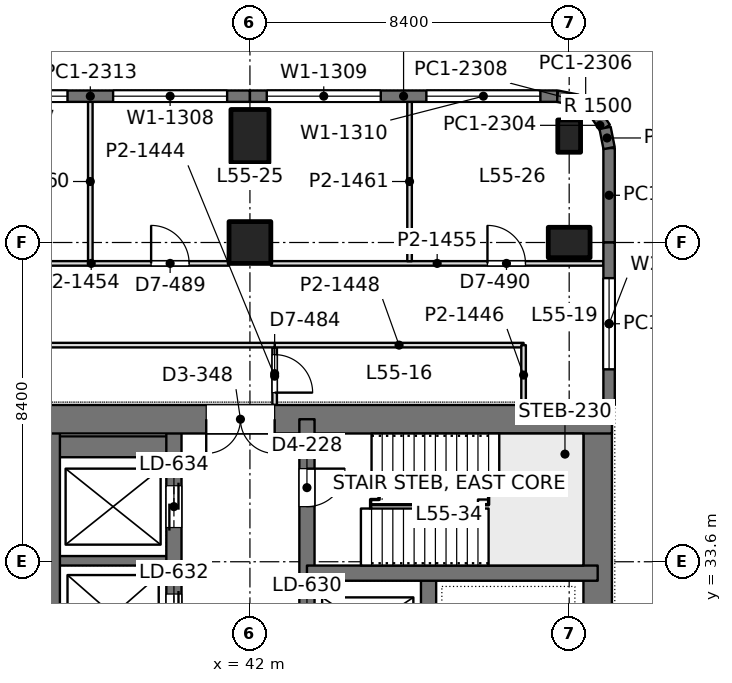
"""IFC4 building model, lengths in metres.
Left out: names, types, materials, properties, quantities, classifications, styles, units other than length and angle.
Written with IfcOpenShell. Run it as: python <this file> out.ifc"""

import sys

from ifc_helpers import new_model, si_unit, direction, frame, frame_2d, origin, origin_2d, place, context, subcontext, project, spatial, rectangle, extrude, element, fill, save


model = new_model("IFC4")
c1 = context("Model", 3, precision=1e-05, world=origin(), true_north=direction((0.0, 1.0)))
c2 = subcontext(c1, "Body", "Model", "MODEL_VIEW")
j1 = project(units=[si_unit("LENGTHUNIT", "METRE"), si_unit("PLANEANGLEUNIT", "RADIAN")], contexts=[c1])
p1 = place(None, origin())
s1 = spatial("IfcSite", under=j1, at=p1, CompositionType="ELEMENT")
p2 = place(p1, origin())
s2 = spatial("IfcBuilding", under=s1, at=p2, CompositionType="ELEMENT")
p3 = place(p2, frame((0.0, 0.0, 240.6)))
s3 = spatial("IfcBuildingStorey", under=s2, at=p3, CompositionType="ELEMENT", Elevation=240.6)
p4 = place(p3, frame((42.0, 42.0, 0.0), z_axis=(0.0, 0.0, 1.0), x_axis=(1.0, 0.0, 0.0)))
e1 = element("IfcColumn", 1, at=p4, inside=s3, PredefinedType="COLUMN", context=c2, shape_type="SweptSolid", body=[
    extrude(rectangle(XDim=1.1, YDim=1.1, at=origin_2d()), origin(), (0.0, 0.0, 1.0), 4.2),
])
p5 = place(p3, frame((42.0, 44.8, 0.0), z_axis=(0.0, 0.0, 1.0), x_axis=(1.0, 0.0, 0.0)))
e2 = element("IfcColumn", 2, at=p5, inside=s3, PredefinedType="COLUMN", context=c2, shape_type="SweptSolid", body=[
    extrude(rectangle(XDim=1.0, YDim=1.4, at=origin_2d()), origin(), (0.0, 0.0, 1.0), 4.2),
])
p6 = place(p3, frame((50.4, 42.0, 0.0), z_axis=(0.0, 0.0, 1.0), x_axis=(0.0, 1.0, 0.0)))
e3 = element("IfcColumn", 3, at=p6, inside=s3, PredefinedType="COLUMN", context=c2, shape_type="SweptSolid", body=[
    extrude(rectangle(XDim=0.8, YDim=1.1, at=origin_2d()), origin(), (0.0, 0.0, 1.0), 4.2),
])
p7 = place(p3, frame((50.4, 44.8, 0.0), z_axis=(0.0, 0.0, 1.0), x_axis=(1.0, 0.0, 0.0)))
e4 = element("IfcColumn", 4, at=p7, inside=s3, PredefinedType="COLUMN", context=c2, shape_type="SweptSolid", body=[
    extrude(rectangle(XDim=0.6, YDim=0.85, at=origin_2d()), origin(), (0.0, 0.0, 1.0), 4.2),
])
p8 = place(p3, frame((33.675, 37.35, 0.0), z_axis=(0.0, 0.0, 1.0), x_axis=(1.0, 0.0, 0.0)))
e5 = element("IfcWall", 5, at=p8, inside=s3, PredefinedType="SHEAR", context=c2, shape_type="SweptSolid", body=[
    extrude(rectangle(XDim=17.85, YDim=0.75, at=frame_2d((8.925, 0.0))), origin(), (0.0, 0.0, 1.0), 4.2),
])
p9 = place(p8, frame((7.175, 0.0, 0.0)))
e6 = element("IfcOpeningElement", 6, at=p9, cuts=e5, PredefinedType="OPENING", context=c2, shape_type="SweptSolid", body=[
    extrude(rectangle(XDim=1.8, YDim=2.4, at=frame_2d((0.9, 1.2))), frame((0.0, 0.385, 0.0), z_axis=(0.0, -1.0, 0.0), x_axis=(1.0, 0.0, 0.0)), (0.0, 0.0, 1.0), 0.77),
])
p10 = place(p3, frame((51.15, 13.05, 0.0), z_axis=(0.0, 0.0, 1.0), x_axis=(0.0, 1.0, 0.0)))
e7 = element("IfcWall", 7, at=p10, inside=s3, PredefinedType="SHEAR", context=c2, shape_type="SweptSolid", body=[
    extrude(rectangle(XDim=24.3, YDim=0.75, at=frame_2d((12.15, 0.0))), origin(), (0.0, 0.0, 1.0), 4.2),
])
p11 = place(p3, frame((43.5, 13.05, 0.0), z_axis=(0.0, 0.0, 1.0), x_axis=(0.0, 1.0, 0.0)))
e8 = element("IfcWall", 8, at=p11, inside=s3, PredefinedType="SHEAR", context=c2, shape_type="SweptSolid", body=[
    extrude(rectangle(XDim=24.3, YDim=0.4, at=frame_2d((12.15, 0.0))), origin(), (0.0, 0.0, 1.0), 4.2),
])
p12 = place(p11, frame((1.3, 0.0, 0.0)))
e9 = element("IfcOpeningElement", 9, at=p12, cuts=e8, PredefinedType="OPENING", context=c2, shape_type="SweptSolid", body=[
    extrude(rectangle(XDim=1.0, YDim=2.2, at=frame_2d((0.5, 1.1))), frame((0.0, 0.21, 0.0), z_axis=(0.0, -1.0, 0.0), x_axis=(1.0, 0.0, 0.0)), (0.0, 0.0, 1.0), 0.42),
])
p13 = place(p11, frame((22.0, 0.0, 0.0)))
e10 = element("IfcOpeningElement", 10, at=p13, cuts=e8, PredefinedType="OPENING", context=c2, shape_type="SweptSolid", body=[
    extrude(rectangle(XDim=1.0, YDim=2.2, at=frame_2d((0.5, 1.1))), frame((0.0, 0.21, 0.0), z_axis=(0.0, -1.0, 0.0), x_axis=(1.0, 0.0, 0.0)), (0.0, 0.0, 1.0), 0.42),
])
p14 = place(p11, frame((5.55, 0.0, 0.0)))
e11 = element("IfcOpeningElement", 11, at=p14, cuts=e8, PredefinedType="OPENING", context=c2, shape_type="SweptSolid", body=[
    extrude(rectangle(XDim=1.0, YDim=2.2, at=frame_2d((0.5, 1.1))), frame((0.0, 0.21, 0.0), z_axis=(0.0, -1.0, 0.0), x_axis=(1.0, 0.0, 0.0)), (0.0, 0.0, 1.0), 0.42),
])
p15 = place(p11, frame((9.55, 0.0, 0.0)))
e12 = element("IfcOpeningElement", 12, at=p15, cuts=e8, PredefinedType="OPENING", context=c2, shape_type="SweptSolid", body=[
    extrude(rectangle(XDim=1.0, YDim=2.2, at=frame_2d((0.5, 1.1))), frame((0.0, 0.21, 0.0), z_axis=(0.0, -1.0, 0.0), x_axis=(1.0, 0.0, 0.0)), (0.0, 0.0, 1.0), 0.42),
])
p16 = place(p11, frame((12.8, 0.0, 0.0)))
e13 = element("IfcOpeningElement", 13, at=p16, cuts=e8, PredefinedType="OPENING", context=c2, shape_type="SweptSolid", body=[
    extrude(rectangle(XDim=1.1, YDim=2.2, at=frame_2d((0.55, 1.1))), frame((0.0, 0.21, 0.0), z_axis=(0.0, -1.0, 0.0), x_axis=(1.0, 0.0, 0.0)), (0.0, 0.0, 1.0), 0.42),
])
p17 = place(p11, frame((15.538, 0.0, 0.0)))
e14 = element("IfcOpeningElement", 14, at=p17, cuts=e8, PredefinedType="OPENING", context=c2, shape_type="SweptSolid", body=[
    extrude(rectangle(XDim=1.1, YDim=2.2, at=frame_2d((0.55, 1.1))), frame((0.0, 0.21, 0.0), z_axis=(0.0, -1.0, 0.0), x_axis=(1.0, 0.0, 0.0)), (0.0, 0.0, 1.0), 0.42),
])
p18 = place(p11, frame((18.262, 0.0, 0.0)))
e15 = element("IfcOpeningElement", 15, at=p18, cuts=e8, PredefinedType="OPENING", context=c2, shape_type="SweptSolid", body=[
    extrude(rectangle(XDim=1.1, YDim=2.2, at=frame_2d((0.55, 1.1))), frame((0.0, 0.21, 0.0), z_axis=(0.0, -1.0, 0.0), x_axis=(1.0, 0.0, 0.0)), (0.0, 0.0, 1.0), 0.42),
])
p19 = place(p3, frame((40.0, 13.05, 0.0), z_axis=(0.0, 0.0, 1.0), x_axis=(0.0, 1.0, 0.0)))
e16 = element("IfcWall", 16, at=p19, inside=s3, PredefinedType="SHEAR", context=c2, shape_type="SweptSolid", body=[
    extrude(rectangle(XDim=24.3, YDim=0.4, at=frame_2d((12.15, 0.0))), origin(), (0.0, 0.0, 1.0), 4.2),
])
p20 = place(p19, frame((15.75, 0.0, 0.0)))
e17 = element("IfcOpeningElement", 17, at=p20, cuts=e16, PredefinedType="OPENING", context=c2, shape_type="SweptSolid", body=[
    extrude(rectangle(XDim=1.1, YDim=2.2, at=frame_2d((0.55, 1.1))), frame((0.0, 0.21, 0.0), z_axis=(0.0, -1.0, 0.0), x_axis=(1.0, 0.0, 0.0)), (0.0, 0.0, 1.0), 0.42),
])
p21 = place(p19, frame((18.6, 0.0, 0.0)))
e18 = element("IfcOpeningElement", 18, at=p21, cuts=e16, PredefinedType="OPENING", context=c2, shape_type="SweptSolid", body=[
    extrude(rectangle(XDim=1.1, YDim=2.2, at=frame_2d((0.55, 1.1))), frame((0.0, 0.21, 0.0), z_axis=(0.0, -1.0, 0.0), x_axis=(1.0, 0.0, 0.0)), (0.0, 0.0, 1.0), 0.42),
])
p22 = place(p19, frame((21.45, 0.0, 0.0)))
e19 = element("IfcOpeningElement", 19, at=p22, cuts=e16, PredefinedType="OPENING", context=c2, shape_type="SweptSolid", body=[
    extrude(rectangle(XDim=1.1, YDim=2.2, at=frame_2d((0.55, 1.1))), frame((0.0, 0.21, 0.0), z_axis=(0.0, -1.0, 0.0), x_axis=(1.0, 0.0, 0.0)), (0.0, 0.0, 1.0), 0.42),
])
p23 = place(p19, frame((8.65, 0.0, 0.0)))
e20 = element("IfcOpeningElement", 20, at=p23, cuts=e16, PredefinedType="OPENING", context=c2, shape_type="SweptSolid", body=[
    extrude(rectangle(XDim=1.8, YDim=2.4, at=frame_2d((0.9, 1.2))), frame((0.0, 0.21, 0.0), z_axis=(0.0, -1.0, 0.0), x_axis=(1.0, 0.0, 0.0)), (0.0, 0.0, 1.0), 0.42),
])
p24 = place(p3, frame((36.8, 27.925, 0.0), z_axis=(0.0, 0.0, 1.0), x_axis=(0.0, 1.0, 0.0)))
e21 = element("IfcWall", 21, at=p24, inside=s3, PredefinedType="SHEAR", context=c2, shape_type="SweptSolid", body=[
    extrude(rectangle(XDim=9.425, YDim=0.4, at=frame_2d((4.712, 0.0))), origin(), (0.0, 0.0, 1.0), 4.2),
])
p25 = place(p3, frame((51.15, 33.3, 0.0), z_axis=(0.0, 0.0, 1.0), x_axis=(-1.0, 0.0, 0.0)))
e22 = element("IfcWall", 22, at=p25, inside=s3, PredefinedType="SHEAR", context=c2, shape_type="SweptSolid", body=[
    extrude(rectangle(XDim=7.65, YDim=0.4, at=frame_2d((3.825, 0.0))), origin(), (0.0, 0.0, 1.0), 4.2),
])
p26 = place(p3, frame((46.7, 27.7, 0.0), z_axis=(0.0, 0.0, 1.0), x_axis=(0.0, 1.0, 0.0)))
e23 = element("IfcWall", 23, at=p26, inside=s3, PredefinedType="SHEAR", context=c2, shape_type="SweptSolid", body=[
    extrude(rectangle(XDim=5.6, YDim=0.4, at=frame_2d((2.8, 0.0))), origin(), (0.0, 0.0, 1.0), 4.2),
])
p27 = place(p3, frame((40.0, 33.625, 0.0), z_axis=(0.0, 0.0, 1.0), x_axis=(-1.0, 0.0, 0.0)))
e24 = element("IfcWall", 24, at=p27, inside=s3, PredefinedType="SHEAR", context=c2, shape_type="SweptSolid", body=[
    extrude(rectangle(XDim=3.2, YDim=0.25, at=frame_2d((1.6, 0.0))), origin(), (0.0, 0.0, 1.0), 4.2),
])
p28 = place(p3, frame((40.0, 36.625, 0.0), z_axis=(0.0, 0.0, 1.0), x_axis=(-1.0, 0.0, 0.0)))
e25 = element("IfcWall", 25, at=p28, inside=s3, PredefinedType="SHEAR", context=c2, shape_type="SweptSolid", body=[
    extrude(rectangle(XDim=3.2, YDim=0.55, at=frame_2d((1.6, 0.0))), origin(), (0.0, 0.0, 1.0), 4.2),
])
p29 = place(p3, frame((33.6, 45.85, 0.0), z_axis=(0.0, 0.0, 1.0), x_axis=(1.0, 0.0, 0.0)))
e26 = element("IfcWall", 26, at=p29, inside=s3, PredefinedType="SOLIDWALL", context=c2, shape_type="SweptSolid", body=[
    extrude(rectangle(XDim=8.4, YDim=0.3, at=frame_2d((4.2, 0.0))), origin(), (0.0, 0.0, 1.0), 4.0),
])
p30 = place(p29, frame((0.6, 0.0, 0.9)))
e27 = element("IfcOpeningElement", 27, at=p30, cuts=e26, PredefinedType="OPENING", context=c2, shape_type="SweptSolid", body=[
    extrude(rectangle(XDim=3.0, YDim=1.9, at=frame_2d((1.5, 0.95))), frame((0.0, 0.16, 0.0), z_axis=(0.0, -1.0, 0.0), x_axis=(1.0, 0.0, 0.0)), (0.0, 0.0, 1.0), 0.32),
])
p31 = place(p29, frame((4.8, 0.0, 0.9)))
e28 = element("IfcOpeningElement", 28, at=p31, cuts=e26, PredefinedType="OPENING", context=c2, shape_type="SweptSolid", body=[
    extrude(rectangle(XDim=3.0, YDim=1.9, at=frame_2d((1.5, 0.95))), frame((0.0, 0.16, 0.0), z_axis=(0.0, -1.0, 0.0), x_axis=(1.0, 0.0, 0.0)), (0.0, 0.0, 1.0), 0.32),
])
p32 = place(p3, frame((42.0, 45.85, 0.0), z_axis=(0.0, 0.0, 1.0), x_axis=(1.0, 0.0, 0.0)))
e29 = element("IfcWall", 29, at=p32, inside=s3, PredefinedType="SOLIDWALL", context=c2, shape_type="SweptSolid", body=[
    extrude(rectangle(XDim=8.085, YDim=0.3, at=frame_2d((4.042, 0.0))), origin(), (0.0, 0.0, 1.0), 4.0),
])
p33 = place(p32, frame((0.443, 0.0, 0.9)))
e30 = element("IfcOpeningElement", 30, at=p33, cuts=e29, PredefinedType="OPENING", context=c2, shape_type="SweptSolid", body=[
    extrude(rectangle(XDim=3.0, YDim=1.9, at=frame_2d((1.5, 0.95))), frame((0.0, 0.16, 0.0), z_axis=(0.0, -1.0, 0.0), x_axis=(1.0, 0.0, 0.0)), (0.0, 0.0, 1.0), 0.32),
])
p34 = place(p32, frame((4.643, 0.0, 0.9)))
e31 = element("IfcOpeningElement", 31, at=p34, cuts=e29, PredefinedType="OPENING", context=c2, shape_type="SweptSolid", body=[
    extrude(rectangle(XDim=3.0, YDim=1.9, at=frame_2d((1.5, 0.95))), frame((0.0, 0.16, 0.0), z_axis=(0.0, -1.0, 0.0), x_axis=(1.0, 0.0, 0.0)), (0.0, 0.0, 1.0), 0.32),
])
p35 = place(p3, frame((50.085, 45.85, 0.0), z_axis=(0.0, 0.0, 1.0), x_axis=(0.980702050465, -0.1955082817, 0.0)))
e32 = element("IfcWall", 32, at=p35, inside=s3, PredefinedType="SOLIDWALL", context=c2, shape_type="SweptSolid", body=[
    extrude(rectangle(XDim=0.541, YDim=0.3, at=frame_2d((0.271, 0.0))), origin(), (0.0, 0.0, 1.0), 4.0),
])
p36 = place(p3, frame((50.615, 45.744, 0.0), z_axis=(0.0, 0.0, 1.0), x_axis=(0.831692711774, -0.555236195849, 0.0)))
e33 = element("IfcWall", 33, at=p36, inside=s3, PredefinedType="SOLIDWALL", context=c2, shape_type="SweptSolid", body=[
    extrude(rectangle(XDim=0.525, YDim=0.3, at=frame_2d((0.263, 0.0))), origin(), (0.0, 0.0, 1.0), 4.0),
])
p37 = place(p3, frame((51.052, 45.453, 0.0), z_axis=(0.0, 0.0, 1.0), x_axis=(0.55534295404, -0.831621430339, 0.0)))
e34 = element("IfcWall", 34, at=p37, inside=s3, PredefinedType="SOLIDWALL", context=c2, shape_type="SweptSolid", body=[
    extrude(rectangle(XDim=0.526, YDim=0.3, at=frame_2d((0.263, 0.0))), origin(), (0.0, 0.0, 1.0), 4.0),
])
p38 = place(p3, frame((51.344, 45.015, 0.0), z_axis=(0.0, 0.0, 1.0), x_axis=(0.195073962632, -0.980788534345, 0.0)))
e35 = element("IfcWall", 35, at=p38, inside=s3, PredefinedType="SOLIDWALL", context=c2, shape_type="SweptSolid", body=[
    extrude(rectangle(XDim=0.541, YDim=0.3, at=frame_2d((0.271, 0.0))), origin(), (0.0, 0.0, 1.0), 4.0),
])
p39 = place(p3, frame((51.45, 44.485, 0.0), z_axis=(0.0, 0.0, 1.0), x_axis=(0.0, -1.0, 0.0)))
e36 = element("IfcWall", 36, at=p39, inside=s3, PredefinedType="SOLIDWALL", context=c2, shape_type="SweptSolid", body=[
    extrude(rectangle(XDim=2.485, YDim=0.3, at=frame_2d((1.243, 0.0))), origin(), (0.0, 0.0, 1.0), 4.0),
])
p40 = place(p3, frame((51.45, 42.0, 0.0), z_axis=(0.0, 0.0, 1.0), x_axis=(0.0, -1.0, 0.0)))
e37 = element("IfcWall", 37, at=p40, inside=s3, PredefinedType="SOLIDWALL", context=c2, shape_type="SweptSolid", body=[
    extrude(rectangle(XDim=4.275, YDim=0.3, at=frame_2d((2.137, 0.0))), origin(), (0.0, 0.0, 1.0), 4.0),
])
p41 = place(p40, frame((0.938, 0.0, 0.9)))
e38 = element("IfcOpeningElement", 38, at=p41, cuts=e37, PredefinedType="OPENING", context=c2, shape_type="SweptSolid", body=[
    extrude(rectangle(XDim=2.4, YDim=1.9, at=frame_2d((1.2, 0.95))), frame((0.0, 0.16, 0.0), z_axis=(0.0, -1.0, 0.0), x_axis=(1.0, 0.0, 0.0)), (0.0, 0.0, 1.0), 0.32),
])
p42 = place(p3, frame((34.199, 41.45, 0.0), z_axis=(0.0, 0.0, 1.0), x_axis=(1.0, 0.0, 0.0)))
e39 = element("IfcWall", 39, at=p42, inside=s3, PredefinedType="PARTITIONING", context=c2, shape_type="SweptSolid", body=[
    extrude(rectangle(XDim=7.25, YDim=0.12, at=frame_2d((3.625, 0.0))), origin(), (0.0, 0.0, 1.0), 3.4),
])
p43 = place(p42, frame((5.201, 0.0, 0.0)))
e40 = element("IfcOpeningElement", 40, at=p43, cuts=e39, PredefinedType="OPENING", context=c2, shape_type="SweptSolid", body=[
    extrude(rectangle(XDim=1.0, YDim=2.4, at=frame_2d((0.5, 1.2))), frame((0.0, 0.07, 0.0), z_axis=(0.0, -1.0, 0.0), x_axis=(1.0, 0.0, 0.0)), (0.0, 0.0, 1.0), 0.14),
])
p44 = place(p3, frame((42.551, 41.45, 0.0), z_axis=(0.0, 0.0, 1.0), x_axis=(1.0, 0.0, 0.0)))
e41 = element("IfcWall", 41, at=p44, inside=s3, PredefinedType="PARTITIONING", context=c2, shape_type="SweptSolid", body=[
    extrude(rectangle(XDim=8.751, YDim=0.12, at=frame_2d((4.375, 0.0))), origin(), (0.0, 0.0, 1.0), 3.4),
])
p45 = place(p44, frame((5.699, 0.0, 0.0)))
e42 = element("IfcOpeningElement", 42, at=p45, cuts=e41, PredefinedType="OPENING", context=c2, shape_type="SweptSolid", body=[
    extrude(rectangle(XDim=1.0, YDim=2.4, at=frame_2d((0.5, 1.2))), frame((0.0, 0.07, 0.0), z_axis=(0.0, -1.0, 0.0), x_axis=(1.0, 0.0, 0.0)), (0.0, 0.0, 1.0), 0.14),
])
for number, where, z_axis, x_axis in (
    (43, (37.8, 41.508, 0.0), (0.0, 0.0, 1.0), (0.0, 1.0, 0.0)),
    (44, (46.2, 41.508, 0.0), (0.0, 0.0, 1.0), (0.0, 1.0, 0.0)),
):
    element("IfcWall", number, at=place(p3, frame(where, z_axis=z_axis, x_axis=x_axis)), inside=s3, PredefinedType="PARTITIONING", context=c2, shape_type="SweptSolid", body=[
        extrude(rectangle(XDim=4.194, YDim=0.12, at=frame_2d((2.097, 0.0))), origin(), (0.0, 0.0, 1.0), 3.3),
    ])
p46 = place(p3, frame((1.2, 39.3, 0.0), z_axis=(0.0, 0.0, 1.0), x_axis=(1.0, 0.0, 0.0)))
e45 = element("IfcWall", 45, at=p46, inside=s3, PredefinedType="PARTITIONING", context=c2, shape_type="SweptSolid", body=[
    extrude(rectangle(XDim=41.452, YDim=0.12, at=frame_2d((20.726, 0.0))), origin(), (0.0, 0.0, 1.0), 3.3),
])
p47 = place(p46, frame((4.3, 0.0, 0.0)))
e46 = element("IfcOpeningElement", 46, at=p47, cuts=e45, PredefinedType="OPENING", context=c2, shape_type="SweptSolid", body=[
    extrude(rectangle(XDim=1.8, YDim=2.2, at=frame_2d((0.9, 1.1))), frame((0.0, 0.07, 0.0), z_axis=(0.0, -1.0, 0.0), x_axis=(1.0, 0.0, 0.0)), (0.0, 0.0, 1.0), 0.14),
])
p48 = place(p46, frame((9.5, 0.0, 0.0)))
e47 = element("IfcOpeningElement", 47, at=p48, cuts=e45, PredefinedType="OPENING", context=c2, shape_type="SweptSolid", body=[
    extrude(rectangle(XDim=1.8, YDim=2.2, at=frame_2d((0.9, 1.1))), frame((0.0, 0.07, 0.0), z_axis=(0.0, -1.0, 0.0), x_axis=(1.0, 0.0, 0.0)), (0.0, 0.0, 1.0), 0.14),
])
p49 = place(p46, frame((23.317, 0.0, 0.0)))
e48 = element("IfcOpeningElement", 48, at=p49, cuts=e45, PredefinedType="OPENING", context=c2, shape_type="SweptSolid", body=[
    extrude(rectangle(XDim=1.8, YDim=2.2, at=frame_2d((0.9, 1.1))), frame((0.0, 0.07, 0.0), z_axis=(0.0, -1.0, 0.0), x_axis=(1.0, 0.0, 0.0)), (0.0, 0.0, 1.0), 0.14),
])
p50 = place(p46, frame((33.0, 0.0, 0.0)))
e49 = element("IfcOpeningElement", 49, at=p50, cuts=e45, PredefinedType="OPENING", context=c2, shape_type="SweptSolid", body=[
    extrude(rectangle(XDim=1.8, YDim=2.2, at=frame_2d((0.9, 1.1))), frame((0.0, 0.07, 0.0), z_axis=(0.0, -1.0, 0.0), x_axis=(1.0, 0.0, 0.0)), (0.0, 0.0, 1.0), 0.14),
])
p51 = place(p3, frame((42.65, 37.724, 0.0), z_axis=(0.0, 0.0, 1.0), x_axis=(0.0, 1.0, 0.0)))
e50 = element("IfcWall", 50, at=p51, inside=s3, PredefinedType="PARTITIONING", context=c2, shape_type="SweptSolid", body=[
    extrude(rectangle(XDim=1.518, YDim=0.12, at=frame_2d((0.759, 0.0))), origin(), (0.0, 0.0, 1.0), 4.0),
])
p52 = place(p51, frame((0.326, 0.0, 0.0)))
e51 = element("IfcOpeningElement", 51, at=p52, cuts=e50, PredefinedType="OPENING", context=c2, shape_type="SweptSolid", body=[
    extrude(rectangle(XDim=1.0, YDim=2.4, at=frame_2d((0.5, 1.2))), frame((0.0, 0.07, 0.0), z_axis=(0.0, -1.0, 0.0), x_axis=(1.0, 0.0, 0.0)), (0.0, 0.0, 1.0), 0.14),
])
p53 = place(p3, frame((42.648, 39.3, 0.0), z_axis=(0.0, 0.0, 1.0), x_axis=(1.0, 0.0, 0.0)))
e52 = element("IfcWall", 52, at=p53, inside=s3, PredefinedType="PARTITIONING", context=c2, shape_type="SweptSolid", body=[
    extrude(rectangle(XDim=6.552, YDim=0.12, at=frame_2d((3.276, 0.0))), origin(), (0.0, 0.0, 1.0), 3.4),
])
p54 = place(p3, frame((49.2, 37.724, 0.0), z_axis=(0.0, 0.0, 1.0), x_axis=(0.0, 1.0, 0.0)))
e53 = element("IfcWall", 53, at=p54, inside=s3, PredefinedType="PARTITIONING", context=c2, shape_type="SweptSolid", body=[
    extrude(rectangle(XDim=1.576, YDim=0.12, at=frame_2d((0.788, 0.0))), origin(), (0.0, 0.0, 1.0), 4.0),
])
p55 = place(p30, origin())
e54 = element("IfcWindow", 54, at=p55, inside=s3, PartitioningType="SINGLE_PANEL", PredefinedType="WINDOW", context=c2, shape_type="SweptSolid", body=[
    extrude(rectangle(XDim=3.0, YDim=1.9, at=frame_2d((1.5, 0.95))), frame((0.0, 0.03, 0.0), z_axis=(0.0, -1.0, 0.0), x_axis=(1.0, 0.0, 0.0)), (0.0, 0.0, 1.0), 0.06),
])
fill(e27, e54)
p56 = place(p31, origin())
e55 = element("IfcWindow", 55, at=p56, inside=s3, PartitioningType="SINGLE_PANEL", PredefinedType="WINDOW", context=c2, shape_type="SweptSolid", body=[
    extrude(rectangle(XDim=3.0, YDim=1.9, at=frame_2d((1.5, 0.95))), frame((0.0, 0.03, 0.0), z_axis=(0.0, -1.0, 0.0), x_axis=(1.0, 0.0, 0.0)), (0.0, 0.0, 1.0), 0.06),
])
fill(e28, e55)
p57 = place(p33, origin())
e56 = element("IfcWindow", 56, at=p57, inside=s3, PartitioningType="SINGLE_PANEL", PredefinedType="WINDOW", context=c2, shape_type="SweptSolid", body=[
    extrude(rectangle(XDim=3.0, YDim=1.9, at=frame_2d((1.5, 0.95))), frame((0.0, 0.03, 0.0), z_axis=(0.0, -1.0, 0.0), x_axis=(1.0, 0.0, 0.0)), (0.0, 0.0, 1.0), 0.06),
])
fill(e30, e56)
p58 = place(p34, origin())
e57 = element("IfcWindow", 57, at=p58, inside=s3, PartitioningType="SINGLE_PANEL", PredefinedType="WINDOW", context=c2, shape_type="SweptSolid", body=[
    extrude(rectangle(XDim=3.0, YDim=1.9, at=frame_2d((1.5, 0.95))), frame((0.0, 0.03, 0.0), z_axis=(0.0, -1.0, 0.0), x_axis=(1.0, 0.0, 0.0)), (0.0, 0.0, 1.0), 0.06),
])
fill(e31, e57)
p59 = place(p41, origin())
e58 = element("IfcWindow", 58, at=p59, inside=s3, PartitioningType="SINGLE_PANEL", PredefinedType="WINDOW", context=c2, shape_type="SweptSolid", body=[
    extrude(rectangle(XDim=2.4, YDim=1.9, at=frame_2d((1.2, 0.95))), frame((0.0, 0.03, 0.0), z_axis=(0.0, -1.0, 0.0), x_axis=(1.0, 0.0, 0.0)), (0.0, 0.0, 1.0), 0.06),
])
fill(e38, e58)
p60 = place(p9, frame((1.8, 0.0, 0.0), z_axis=(0.0, 0.0, 1.0), x_axis=(-1.0, 0.0, 0.0)))
e59 = element("IfcDoor", 59, at=p60, inside=s3, OperationType="DOUBLE_DOOR_SINGLE_SWING", PredefinedType="DOOR", context=c2, shape_type="SweptSolid", body=[
    extrude(rectangle(XDim=1.8, YDim=2.4, at=frame_2d((0.9, 1.2))), frame((0.0, 0.025, 0.0), z_axis=(0.0, -1.0, 0.0), x_axis=(1.0, 0.0, 0.0)), (0.0, 0.0, 1.0), 0.05),
])
fill(e6, e59)
p61 = place(p13, frame((1.0, 0.0, 0.0), z_axis=(0.0, 0.0, 1.0), x_axis=(-1.0, 0.0, 0.0)))
e60 = element("IfcDoor", 60, at=p61, inside=s3, OperationType="SINGLE_SWING_LEFT", PredefinedType="DOOR", context=c2, shape_type="SweptSolid", body=[
    extrude(rectangle(XDim=1.0, YDim=2.2, at=frame_2d((0.5, 1.1))), frame((0.0, 0.025, 0.0), z_axis=(0.0, -1.0, 0.0), x_axis=(1.0, 0.0, 0.0)), (0.0, 0.0, 1.0), 0.05),
])
fill(e10, e60)
p62 = place(p21, origin())
e61 = element("IfcDoor", 61, at=p62, inside=s3, OperationType="DOUBLE_DOOR_SLIDING", PredefinedType="DOOR", context=c2, shape_type="SweptSolid", body=[
    extrude(rectangle(XDim=1.1, YDim=2.2, at=frame_2d((0.55, 1.1))), frame((0.0, 0.025, 0.0), z_axis=(0.0, -1.0, 0.0), x_axis=(1.0, 0.0, 0.0)), (0.0, 0.0, 1.0), 0.05),
])
fill(e18, e61)
p63 = place(p22, origin())
e62 = element("IfcDoor", 62, at=p63, inside=s3, OperationType="DOUBLE_DOOR_SLIDING", PredefinedType="DOOR", context=c2, shape_type="SweptSolid", body=[
    extrude(rectangle(XDim=1.1, YDim=2.2, at=frame_2d((0.55, 1.1))), frame((0.0, 0.025, 0.0), z_axis=(0.0, -1.0, 0.0), x_axis=(1.0, 0.0, 0.0)), (0.0, 0.0, 1.0), 0.05),
])
fill(e19, e62)
p64 = place(p43, origin())
e63 = element("IfcDoor", 63, at=p64, inside=s3, OperationType="SINGLE_SWING_LEFT", PredefinedType="DOOR", context=c2, shape_type="SweptSolid", body=[
    extrude(rectangle(XDim=1.0, YDim=2.4, at=frame_2d((0.5, 1.2))), frame((0.0, 0.025, 0.0), z_axis=(0.0, -1.0, 0.0), x_axis=(1.0, 0.0, 0.0)), (0.0, 0.0, 1.0), 0.05),
])
fill(e40, e63)
p65 = place(p45, origin())
e64 = element("IfcDoor", 64, at=p65, inside=s3, OperationType="SINGLE_SWING_LEFT", PredefinedType="DOOR", context=c2, shape_type="SweptSolid", body=[
    extrude(rectangle(XDim=1.0, YDim=2.4, at=frame_2d((0.5, 1.2))), frame((0.0, 0.025, 0.0), z_axis=(0.0, -1.0, 0.0), x_axis=(1.0, 0.0, 0.0)), (0.0, 0.0, 1.0), 0.05),
])
fill(e42, e64)
p66 = place(p52, frame((1.0, 0.0, 0.0), z_axis=(0.0, 0.0, 1.0), x_axis=(-1.0, 0.0, 0.0)))
e65 = element("IfcDoor", 65, at=p66, inside=s3, OperationType="SINGLE_SWING_RIGHT", PredefinedType="DOOR", context=c2, shape_type="SweptSolid", body=[
    extrude(rectangle(XDim=1.0, YDim=2.4, at=frame_2d((0.5, 1.2))), frame((0.0, 0.025, 0.0), z_axis=(0.0, -1.0, 0.0), x_axis=(1.0, 0.0, 0.0)), (0.0, 0.0, 1.0), 0.05),
])
fill(e51, e65)
save(model, sys.argv[1])
